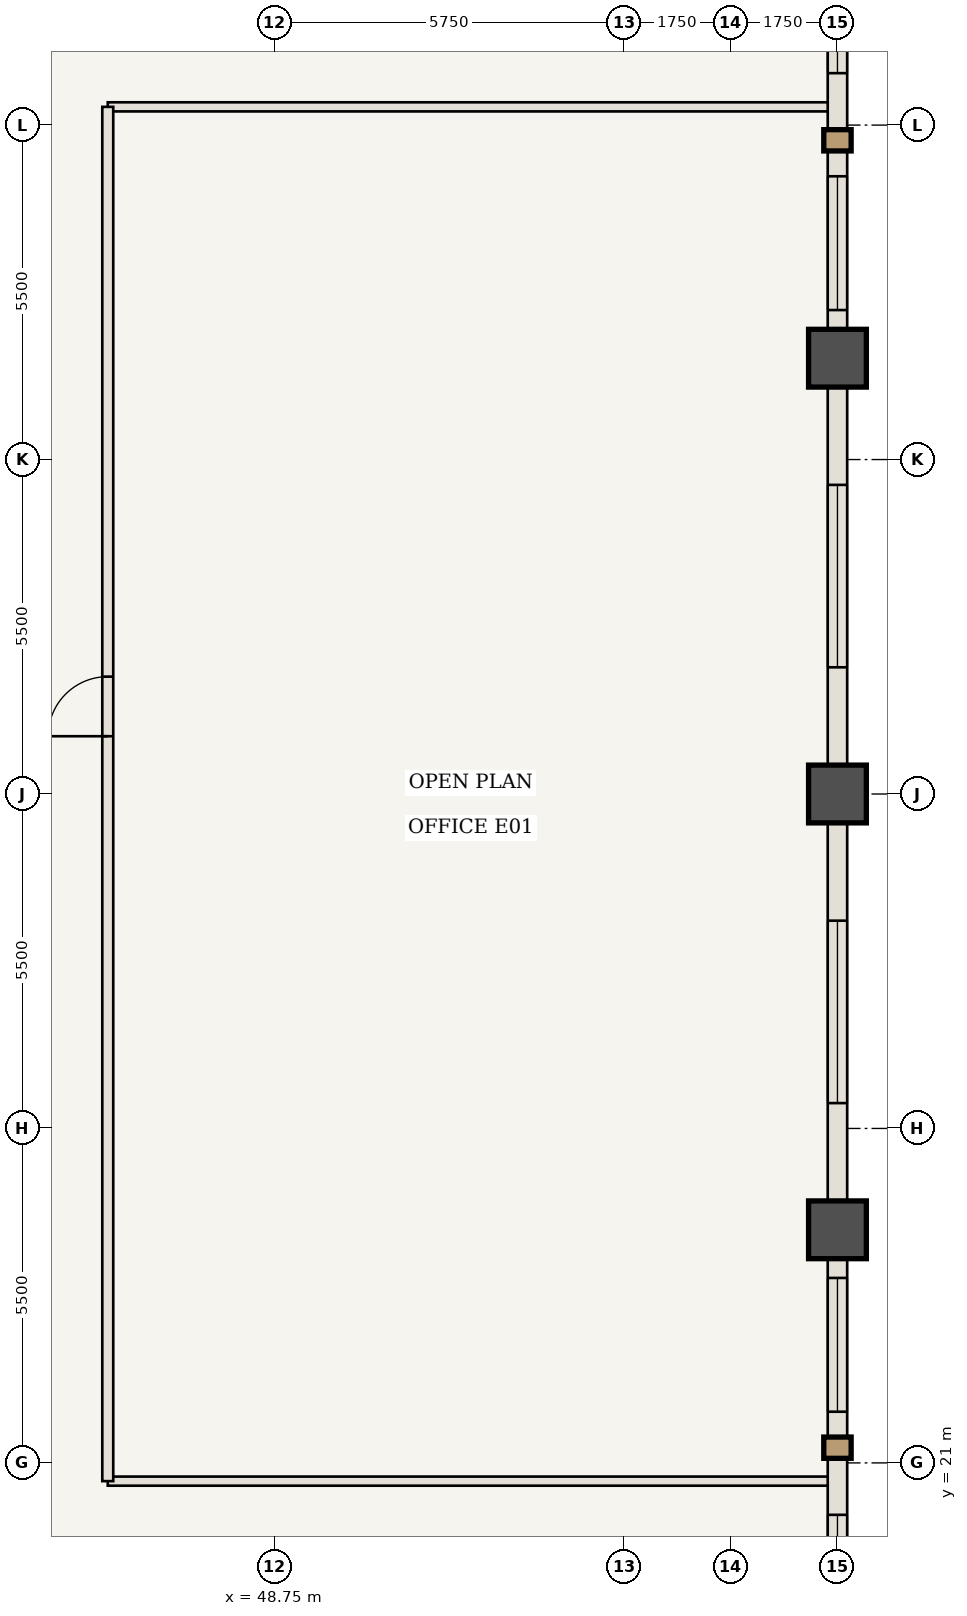
"""IFC4 building model, lengths in metres.
Left out: names, types, materials, properties, quantities, classifications, styles, units other than length and angle.
Written with IfcOpenShell. Run it as: python <this file> out.ifc"""

import sys

from ifc_helpers import new_model, si_unit, direction, frame, frame_2d, origin, origin_2d, place, context, subcontext, project, spatial, rectangle, extrude, element, fill, save


model = new_model("IFC4")
c1 = context("Model", 3, precision=1e-05, world=origin(), true_north=direction((0.0, 1.0)))
c2 = subcontext(c1, "Body", "Model", "MODEL_VIEW")
j1 = project(units=[si_unit("LENGTHUNIT", "METRE"), si_unit("PLANEANGLEUNIT", "RADIAN")], contexts=[c1])
p1 = place(None, origin())
s1 = spatial("IfcSite", under=j1, at=p1, CompositionType="ELEMENT")
p2 = place(p1, origin())
s2 = spatial("IfcBuilding", under=s1, at=p2, CompositionType="ELEMENT")
p3 = place(p2, frame((0.0, 0.0, 122.15)))
s3 = spatial("IfcBuildingStorey", under=s2, at=p3, CompositionType="ELEMENT", Elevation=122.15)
for number, where, z_axis, x_axis in (
    (1, (58.0, 24.833, 0.0), (0.0, 0.0, 1.0), (1.0, 0.0, 0.0)),
    (2, (58.0, 32.0, 0.0), (0.0, 0.0, 1.0), (1.0, 0.0, 0.0)),
    (3, (58.0, 39.167, 0.0), (0.0, 0.0, 1.0), (1.0, 0.0, 0.0)),
):
    element("IfcColumn", number, at=place(p3, frame(where, z_axis=z_axis, x_axis=x_axis)), inside=s3, PredefinedType="COLUMN", context=c2, shape_type="SweptSolid", body=[
        extrude(rectangle(XDim=0.95, YDim=0.95, at=origin_2d()), origin(), (0.0, 0.0, 1.0), 3.85),
    ])
for number, where, z_axis, x_axis in (
    (4, (46.0, 20.7, 0.0), (0.0, 0.0, 1.0), (1.0, 0.0, 0.0)),
    (5, (46.0, 43.3, 0.0), (0.0, 0.0, 1.0), (1.0, 0.0, 0.0)),
):
    element("IfcWall", number, at=place(p3, frame(where, z_axis=z_axis, x_axis=x_axis)), inside=s3, PredefinedType="STANDARD", context=c2, shape_type="SweptSolid", body=[
        extrude(rectangle(XDim=11.94, YDim=0.15, at=frame_2d((5.97, 0.0))), origin(), (0.0, 0.0, 1.0), 3.065),
    ])
p4 = place(p3, frame((46.0, 20.7, 0.0), z_axis=(0.0, 0.0, 1.0), x_axis=(0.0, 1.0, 0.0)))
e6 = element("IfcWall", 6, at=p4, inside=s3, PredefinedType="STANDARD", context=c2, shape_type="SweptSolid", body=[
    extrude(rectangle(XDim=22.6, YDim=0.18, at=frame_2d((11.3, 0.0))), origin(), (0.0, 0.0, 1.0), 3.685),
])
p5 = place(p4, frame((12.25, 0.0, 0.0)))
e7 = element("IfcOpeningElement", 7, at=p5, cuts=e6, PredefinedType="OPENING", context=c2, shape_type="SweptSolid", body=[
    extrude(rectangle(XDim=0.98, YDim=2.2, at=frame_2d((0.49, 1.1))), frame((0.0, 0.1, 0.0), z_axis=(0.0, -1.0, 0.0), x_axis=(1.0, 0.0, 0.0)), (0.0, 0.0, 1.0), 0.2),
])
p6 = place(p3, frame((58.0, 24.833, 0.0), z_axis=(0.0, 0.0, 1.0), x_axis=(0.0, -1.0, 0.0)))
e8 = element("IfcWall", 8, at=p6, inside=s3, PredefinedType="USERDEFINED", context=c2, shape_type="SweptSolid", body=[
    extrude(rectangle(XDim=7.167, YDim=0.32, at=frame_2d((3.583, 0.0))), origin(), (0.0, 0.0, 1.0), 2.885),
])
p7 = place(p6, frame((0.792, 0.0, 0.85)))
e9 = element("IfcOpeningElement", 9, at=p7, cuts=e8, PredefinedType="OPENING", context=c2, shape_type="SweptSolid", body=[
    extrude(rectangle(XDim=2.2, YDim=1.835, at=frame_2d((1.1, 0.917))), frame((0.0, 0.17, 0.0), z_axis=(0.0, -1.0, 0.0), x_axis=(1.0, 0.0, 0.0)), (0.0, 0.0, 1.0), 0.34),
])
p8 = place(p6, frame((4.688, 0.0, 0.85)))
e10 = element("IfcOpeningElement", 10, at=p8, cuts=e8, PredefinedType="OPENING", context=c2, shape_type="SweptSolid", body=[
    extrude(rectangle(XDim=1.6, YDim=1.835, at=frame_2d((0.8, 0.917))), frame((0.0, 0.17, 0.0), z_axis=(0.0, -1.0, 0.0), x_axis=(1.0, 0.0, 0.0)), (0.0, 0.0, 1.0), 0.34),
])
p9 = place(p3, frame((58.0, 32.0, 0.0), z_axis=(0.0, 0.0, 1.0), x_axis=(0.0, -1.0, 0.0)))
e11 = element("IfcWall", 11, at=p9, inside=s3, PredefinedType="USERDEFINED", context=c2, shape_type="SweptSolid", body=[
    extrude(rectangle(XDim=7.167, YDim=0.32, at=frame_2d((3.583, 0.0))), origin(), (0.0, 0.0, 1.0), 2.885),
])
p10 = place(p9, frame((2.083, 0.0, 0.85)))
e12 = element("IfcOpeningElement", 12, at=p10, cuts=e11, PredefinedType="OPENING", context=c2, shape_type="SweptSolid", body=[
    extrude(rectangle(XDim=3.0, YDim=1.835, at=frame_2d((1.5, 0.917))), frame((0.0, 0.17, 0.0), z_axis=(0.0, -1.0, 0.0), x_axis=(1.0, 0.0, 0.0)), (0.0, 0.0, 1.0), 0.34),
])
p11 = place(p3, frame((58.0, 39.167, 0.0), z_axis=(0.0, 0.0, 1.0), x_axis=(0.0, -1.0, 0.0)))
e13 = element("IfcWall", 13, at=p11, inside=s3, PredefinedType="USERDEFINED", context=c2, shape_type="SweptSolid", body=[
    extrude(rectangle(XDim=7.167, YDim=0.32, at=frame_2d((3.583, 0.0))), origin(), (0.0, 0.0, 1.0), 2.885),
])
p12 = place(p11, frame((2.083, 0.0, 0.85)))
e14 = element("IfcOpeningElement", 14, at=p12, cuts=e13, PredefinedType="OPENING", context=c2, shape_type="SweptSolid", body=[
    extrude(rectangle(XDim=3.0, YDim=1.835, at=frame_2d((1.5, 0.917))), frame((0.0, 0.17, 0.0), z_axis=(0.0, -1.0, 0.0), x_axis=(1.0, 0.0, 0.0)), (0.0, 0.0, 1.0), 0.34),
])
p13 = place(p3, frame((58.0, 46.333, 0.0), z_axis=(0.0, 0.0, 1.0), x_axis=(0.0, -1.0, 0.0)))
e15 = element("IfcWall", 15, at=p13, inside=s3, PredefinedType="USERDEFINED", context=c2, shape_type="SweptSolid", body=[
    extrude(rectangle(XDim=7.167, YDim=0.32, at=frame_2d((3.583, 0.0))), origin(), (0.0, 0.0, 1.0), 2.885),
])
p14 = place(p13, frame((0.879, 0.0, 0.85)))
e16 = element("IfcOpeningElement", 16, at=p14, cuts=e15, PredefinedType="OPENING", context=c2, shape_type="SweptSolid", body=[
    extrude(rectangle(XDim=1.6, YDim=1.835, at=frame_2d((0.8, 0.917))), frame((0.0, 0.17, 0.0), z_axis=(0.0, -1.0, 0.0), x_axis=(1.0, 0.0, 0.0)), (0.0, 0.0, 1.0), 0.34),
])
p15 = place(p13, frame((4.175, 0.0, 0.85)))
e17 = element("IfcOpeningElement", 17, at=p15, cuts=e15, PredefinedType="OPENING", context=c2, shape_type="SweptSolid", body=[
    extrude(rectangle(XDim=2.2, YDim=1.835, at=frame_2d((1.1, 0.917))), frame((0.0, 0.17, 0.0), z_axis=(0.0, -1.0, 0.0), x_axis=(1.0, 0.0, 0.0)), (0.0, 0.0, 1.0), 0.34),
])
p16 = place(p5, origin())
e18 = element("IfcDoor", 18, at=p16, inside=s3, OperationType="SINGLE_SWING_LEFT", PredefinedType="DOOR", context=c2, shape_type="SweptSolid", body=[
    extrude(rectangle(XDim=0.98, YDim=2.2, at=frame_2d((0.49, 1.1))), frame((0.0, 0.025, 0.0), z_axis=(0.0, -1.0, 0.0), x_axis=(1.0, 0.0, 0.0)), (0.0, 0.0, 1.0), 0.05),
])
fill(e7, e18)
p17 = place(p7, origin())
e19 = element("IfcWindow", 19, at=p17, inside=s3, PartitioningType="SINGLE_PANEL", PredefinedType="WINDOW", context=c2, shape_type="SweptSolid", body=[
    extrude(rectangle(XDim=2.2, YDim=1.835, at=frame_2d((1.1, 0.917))), frame((0.0, 0.03, 0.0), z_axis=(0.0, -1.0, 0.0), x_axis=(1.0, 0.0, 0.0)), (0.0, 0.0, 1.0), 0.06),
])
fill(e9, e19)
p18 = place(p8, origin())
e20 = element("IfcWindow", 20, at=p18, inside=s3, PartitioningType="SINGLE_PANEL", PredefinedType="WINDOW", context=c2, shape_type="SweptSolid", body=[
    extrude(rectangle(XDim=1.6, YDim=1.835, at=frame_2d((0.8, 0.917))), frame((0.0, 0.03, 0.0), z_axis=(0.0, -1.0, 0.0), x_axis=(1.0, 0.0, 0.0)), (0.0, 0.0, 1.0), 0.06),
])
fill(e10, e20)
p19 = place(p10, origin())
e21 = element("IfcWindow", 21, at=p19, inside=s3, PartitioningType="SINGLE_PANEL", PredefinedType="WINDOW", context=c2, shape_type="SweptSolid", body=[
    extrude(rectangle(XDim=3.0, YDim=1.835, at=frame_2d((1.5, 0.917))), frame((0.0, 0.03, 0.0), z_axis=(0.0, -1.0, 0.0), x_axis=(1.0, 0.0, 0.0)), (0.0, 0.0, 1.0), 0.06),
])
fill(e12, e21)
p20 = place(p12, origin())
e22 = element("IfcWindow", 22, at=p20, inside=s3, PartitioningType="SINGLE_PANEL", PredefinedType="WINDOW", context=c2, shape_type="SweptSolid", body=[
    extrude(rectangle(XDim=3.0, YDim=1.835, at=frame_2d((1.5, 0.917))), frame((0.0, 0.03, 0.0), z_axis=(0.0, -1.0, 0.0), x_axis=(1.0, 0.0, 0.0)), (0.0, 0.0, 1.0), 0.06),
])
fill(e14, e22)
p21 = place(p14, origin())
e23 = element("IfcWindow", 23, at=p21, inside=s3, PartitioningType="SINGLE_PANEL", PredefinedType="WINDOW", context=c2, shape_type="SweptSolid", body=[
    extrude(rectangle(XDim=1.6, YDim=1.835, at=frame_2d((0.8, 0.917))), frame((0.0, 0.03, 0.0), z_axis=(0.0, -1.0, 0.0), x_axis=(1.0, 0.0, 0.0)), (0.0, 0.0, 1.0), 0.06),
])
fill(e16, e23)
p22 = place(p15, origin())
e24 = element("IfcWindow", 24, at=p22, inside=s3, PartitioningType="SINGLE_PANEL", PredefinedType="WINDOW", context=c2, shape_type="SweptSolid", body=[
    extrude(rectangle(XDim=2.2, YDim=1.835, at=frame_2d((1.1, 0.917))), frame((0.0, 0.03, 0.0), z_axis=(0.0, -1.0, 0.0), x_axis=(1.0, 0.0, 0.0)), (0.0, 0.0, 1.0), 0.06),
])
fill(e17, e24)
save(model, sys.argv[1])
